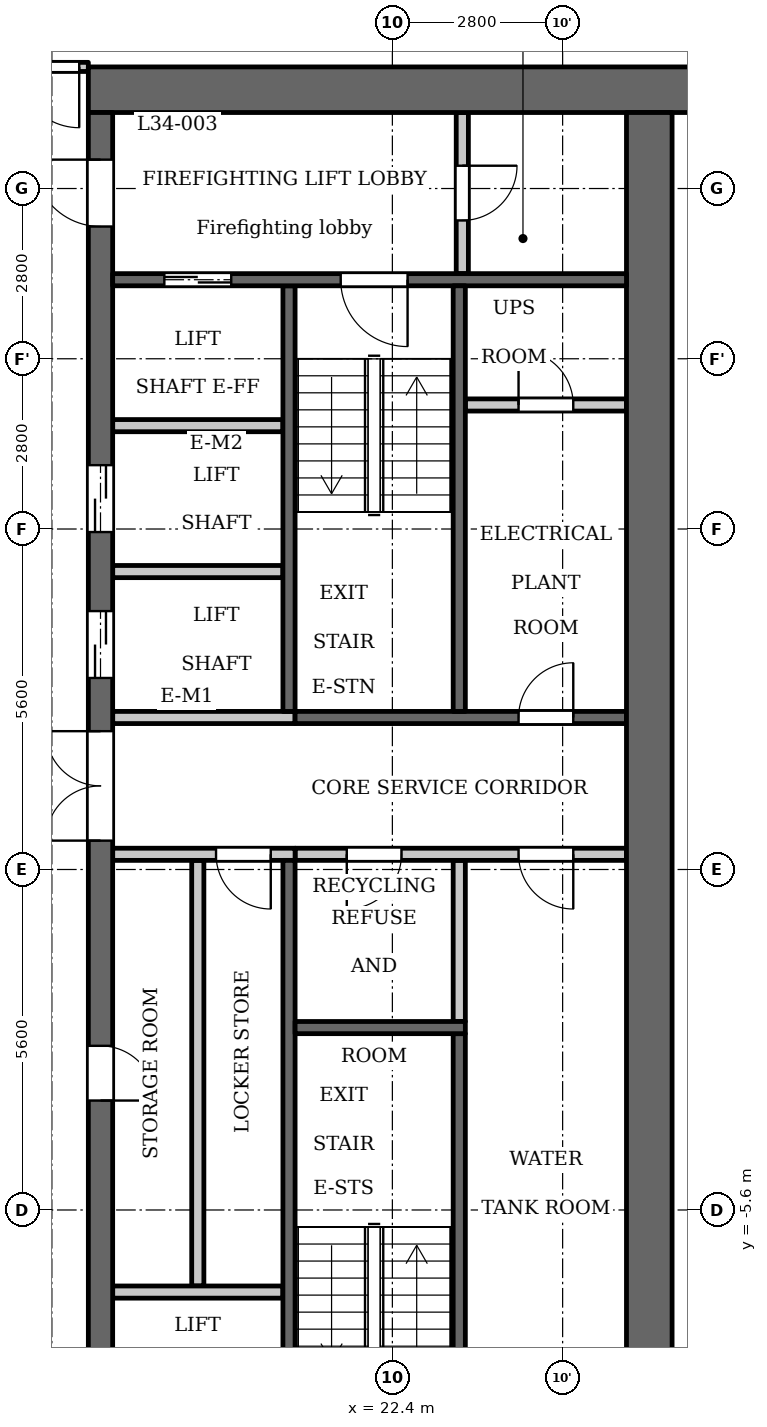
"""IFC4 building model, lengths in metres.
Left out: names, types, materials, properties, quantities, classifications, styles, units other than length and angle.
Written with IfcOpenShell. Run it as: python <this file> out.ifc"""

import sys

from ifc_helpers import new_model, si_unit, direction, frame, frame_2d, origin, place, context, subcontext, project, spatial, rectangle, extrude, element, fill, save


model = new_model("IFC4")
c1 = context("Model", 3, precision=1e-05, world=origin(), true_north=direction((0.0, 1.0)))
c2 = subcontext(c1, "Body", "Model", "MODEL_VIEW")
j1 = project(units=[si_unit("LENGTHUNIT", "METRE"), si_unit("PLANEANGLEUNIT", "RADIAN")], contexts=[c1])
p1 = place(None, origin())
s1 = spatial("IfcSite", under=j1, at=p1, CompositionType="ELEMENT")
p2 = place(p1, origin())
s2 = spatial("IfcBuilding", under=s1, at=p2, CompositionType="ELEMENT")
p3 = place(p2, frame((0.0, 0.0, 136.1)))
s3 = spatial("IfcBuildingStorey", under=s2, at=p3, CompositionType="ELEMENT", Elevation=136.1)
p4 = place(p3, frame((23.5, -2.5, 0.0), z_axis=(0.0, 0.0, 1.0), x_axis=(0.0, 1.0, 0.0)))
e1 = element("IfcWall", 1, at=p4, inside=s3, PredefinedType="PARTITIONING", context=c2, shape_type="SweptSolid", body=[
    extrude(rectangle(XDim=2.65, YDim=0.2, at=frame_2d((1.325, 0.0))), origin(), (0.0, 0.0, 1.0), 3.2),
])
p5 = place(p3, frame((20.7, 2.6, 0.0), z_axis=(0.0, 0.0, 1.0), x_axis=(0.0, 1.0, 0.0)))
e2 = element("IfcWall", 2, at=p5, inside=s3, PredefinedType="SHEAR", context=c2, shape_type="SweptSolid", body=[
    extrude(rectangle(XDim=7.0, YDim=0.2, at=frame_2d((3.5, 0.0))), origin(), (0.0, 0.0, 1.0), 3.2),
])
p6 = place(p3, frame((20.7, -9.6, 0.0), z_axis=(0.0, 0.0, 1.0), x_axis=(0.0, 1.0, 0.0)))
e3 = element("IfcWall", 3, at=p6, inside=s3, PredefinedType="SHEAR", context=c2, shape_type="SweptSolid", body=[
    extrude(rectangle(XDim=9.75, YDim=0.2, at=frame_2d((4.875, 0.0))), origin(), (0.0, 0.0, 1.0), 3.2),
])
p7 = place(p3, frame((20.8, 2.5, 0.0), z_axis=(0.0, 0.0, 1.0), x_axis=(1.0, 0.0, 0.0)))
e4 = element("IfcWall", 4, at=p7, inside=s3, PredefinedType="SHEAR", context=c2, shape_type="SweptSolid", body=[
    extrude(rectangle(XDim=5.45, YDim=0.2, at=frame_2d((2.725, 0.0))), origin(), (0.0, 0.0, 1.0), 3.2),
])
p8 = place(p7, frame((3.675, 0.0, 0.0)))
e5 = element("IfcOpeningElement", 5, at=p8, cuts=e4, PredefinedType="OPENING", context=c2, shape_type="SweptSolid", body=[
    extrude(rectangle(XDim=0.9, YDim=2.1, at=frame_2d((0.45, 1.05))), frame((0.0, 0.11, 0.0), z_axis=(0.0, -1.0, 0.0), x_axis=(1.0, 0.0, 0.0)), (0.0, 0.0, 1.0), 0.22),
])
p9 = place(p3, frame((20.8, 0.25, 0.0), z_axis=(0.0, 0.0, 1.0), x_axis=(1.0, 0.0, 0.0)))
e6 = element("IfcWall", 6, at=p9, inside=s3, PredefinedType="PARTITIONING", context=c2, shape_type="SweptSolid", body=[
    extrude(rectangle(XDim=5.45, YDim=0.2, at=frame_2d((2.725, 0.0))), origin(), (0.0, 0.0, 1.0), 3.2),
])
p10 = place(p9, frame((0.85, 0.0, 0.0)))
e7 = element("IfcOpeningElement", 7, at=p10, cuts=e6, PredefinedType="OPENING", context=c2, shape_type="SweptSolid", body=[
    extrude(rectangle(XDim=0.9, YDim=2.1, at=frame_2d((0.45, 1.05))), frame((0.0, 0.11, 0.0), z_axis=(0.0, -1.0, 0.0), x_axis=(1.0, 0.0, 0.0)), (0.0, 0.0, 1.0), 0.22),
])
p11 = place(p9, frame((3.675, 0.0, 0.0)))
e8 = element("IfcOpeningElement", 8, at=p11, cuts=e6, PredefinedType="OPENING", context=c2, shape_type="SweptSolid", body=[
    extrude(rectangle(XDim=0.9, YDim=2.1, at=frame_2d((0.45, 1.05))), frame((0.0, 0.11, 0.0), z_axis=(0.0, -1.0, 0.0), x_axis=(1.0, 0.0, 0.0)), (0.0, 0.0, 1.0), 0.22),
])
p12 = place(p3, frame((17.4, 12.825, 0.0), z_axis=(0.0, 0.0, 1.0), x_axis=(1.0, 0.0, 0.0)))
e9 = element("IfcWall", 9, at=p12, inside=s3, PredefinedType="SHEAR", context=c2, shape_type="SweptSolid", body=[
    extrude(rectangle(XDim=10.4, YDim=0.75, at=frame_2d((5.2, 0.0))), origin(), (0.0, 0.0, 1.0), 3.2),
])
p13 = place(p3, frame((19.2, -6.85, 0.0), z_axis=(0.0, 0.0, 1.0), x_axis=(0.0, 1.0, 0.0)))
e10 = element("IfcWall", 10, at=p13, inside=s3, PredefinedType="PARTITIONING", context=c2, shape_type="SweptSolid", body=[
    extrude(rectangle(XDim=7.0, YDim=0.2, at=frame_2d((3.5, 0.0))), origin(), (0.0, 0.0, 1.0), 3.2),
])
p14 = place(p3, frame((17.6, -12.45, 0.0), z_axis=(0.0, 0.0, 1.0), x_axis=(0.0, 1.0, 0.0)))
e11 = element("IfcWall", 11, at=p14, inside=s3, PredefinedType="SHEAR", context=c2, shape_type="SweptSolid", body=[
    extrude(rectangle(XDim=24.9, YDim=0.4, at=frame_2d((12.45, 0.0))), origin(), (0.0, 0.0, 1.0), 3.2),
])
p15 = place(p14, frame((8.65, 0.0, 0.0)))
e12 = element("IfcOpeningElement", 12, at=p15, cuts=e11, PredefinedType="OPENING", context=c2, shape_type="SweptSolid", body=[
    extrude(rectangle(XDim=0.9, YDim=2.1, at=frame_2d((0.45, 1.05))), frame((0.0, 0.21, 0.0), z_axis=(0.0, -1.0, 0.0), x_axis=(1.0, 0.0, 0.0)), (0.0, 0.0, 1.0), 0.42),
])
p16 = place(p14, frame((15.6, 0.0, 0.0)))
e13 = element("IfcOpeningElement", 13, at=p16, cuts=e11, PredefinedType="OPENING", context=c2, shape_type="SweptSolid", body=[
    extrude(rectangle(XDim=1.1, YDim=2.1, at=frame_2d((0.55, 1.05))), frame((0.0, 0.21, 0.0), z_axis=(0.0, -1.0, 0.0), x_axis=(1.0, 0.0, 0.0)), (0.0, 0.0, 1.0), 0.42),
])
p17 = place(p14, frame((18.0, 0.0, 0.0)))
e14 = element("IfcOpeningElement", 14, at=p17, cuts=e11, PredefinedType="OPENING", context=c2, shape_type="SweptSolid", body=[
    extrude(rectangle(XDim=1.1, YDim=2.1, at=frame_2d((0.55, 1.05))), frame((0.0, 0.21, 0.0), z_axis=(0.0, -1.0, 0.0), x_axis=(1.0, 0.0, 0.0)), (0.0, 0.0, 1.0), 0.42),
])
p18 = place(p14, frame((23.025, 0.0, 0.0)))
e15 = element("IfcOpeningElement", 15, at=p18, cuts=e11, PredefinedType="OPENING", context=c2, shape_type="SweptSolid", body=[
    extrude(rectangle(XDim=1.1, YDim=2.1, at=frame_2d((0.55, 1.05))), frame((0.0, 0.21, 0.0), z_axis=(0.0, -1.0, 0.0), x_axis=(1.0, 0.0, 0.0)), (0.0, 0.0, 1.0), 0.42),
])
p19 = place(p14, frame((0.775, 0.0, 0.0)))
e16 = element("IfcOpeningElement", 16, at=p19, cuts=e11, PredefinedType="OPENING", context=c2, shape_type="SweptSolid", body=[
    extrude(rectangle(XDim=1.1, YDim=2.1, at=frame_2d((0.55, 1.05))), frame((0.0, 0.21, 0.0), z_axis=(0.0, -1.0, 0.0), x_axis=(1.0, 0.0, 0.0)), (0.0, 0.0, 1.0), 0.42),
])
p20 = place(p14, frame((12.925, 0.0, 0.0)))
e17 = element("IfcOpeningElement", 17, at=p20, cuts=e11, PredefinedType="OPENING", context=c2, shape_type="SweptSolid", body=[
    extrude(rectangle(XDim=1.8, YDim=2.1, at=frame_2d((0.9, 1.05))), frame((0.0, 0.21, 0.0), z_axis=(0.0, -1.0, 0.0), x_axis=(1.0, 0.0, 0.0)), (0.0, 0.0, 1.0), 0.42),
])
p21 = place(p3, frame((26.625, -12.45, 0.0), z_axis=(0.0, 0.0, 1.0), x_axis=(0.0, 1.0, 0.0)))
e18 = element("IfcWall", 18, at=p21, inside=s3, PredefinedType="SHEAR", context=c2, shape_type="SweptSolid", body=[
    extrude(rectangle(XDim=24.9, YDim=0.75, at=frame_2d((12.45, 0.0))), origin(), (0.0, 0.0, 1.0), 3.2),
])
p22 = place(p3, frame((23.55, 9.8, 0.0), z_axis=(0.0, 0.0, 1.0), x_axis=(0.0, 1.0, 0.0)))
e19 = element("IfcWall", 19, at=p22, inside=s3, PredefinedType="PARTITIONING", context=c2, shape_type="SweptSolid", body=[
    extrude(rectangle(XDim=2.65, YDim=0.2, at=frame_2d((1.325, 0.0))), origin(), (0.0, 0.0, 1.0), 3.2),
])
p23 = place(p22, frame((0.875, 0.0, 0.0)))
e20 = element("IfcOpeningElement", 20, at=p23, cuts=e19, PredefinedType="OPENING", context=c2, shape_type="SweptSolid", body=[
    extrude(rectangle(XDim=0.9, YDim=2.1, at=frame_2d((0.45, 1.05))), frame((0.0, 0.11, 0.0), z_axis=(0.0, -1.0, 0.0), x_axis=(1.0, 0.0, 0.0)), (0.0, 0.0, 1.0), 0.22),
])
p24 = place(p3, frame((23.6, 7.64, 0.0), z_axis=(0.0, 0.0, 1.0), x_axis=(1.0, 0.0, 0.0)))
e21 = element("IfcWall", 21, at=p24, inside=s3, PredefinedType="PARTITIONING", context=c2, shape_type="SweptSolid", body=[
    extrude(rectangle(XDim=2.65, YDim=0.2, at=frame_2d((1.325, 0.0))), origin(), (0.0, 0.0, 1.0), 3.2),
])
p25 = place(p24, frame((0.875, 0.0, 0.0)))
e22 = element("IfcOpeningElement", 22, at=p25, cuts=e21, PredefinedType="OPENING", context=c2, shape_type="SweptSolid", body=[
    extrude(rectangle(XDim=0.9, YDim=2.1, at=frame_2d((0.45, 1.05))), frame((0.0, 0.11, 0.0), z_axis=(0.0, -1.0, 0.0), x_axis=(1.0, 0.0, 0.0)), (0.0, 0.0, 1.0), 0.22),
])
p26 = place(p3, frame((17.8, -6.95, 0.0), z_axis=(0.0, 0.0, 1.0), x_axis=(1.0, 0.0, 0.0)))
e23 = element("IfcWall", 23, at=p26, inside=s3, PredefinedType="PARTITIONING", context=c2, shape_type="SweptSolid", body=[
    extrude(rectangle(XDim=2.8, YDim=0.2, at=frame_2d((1.4, 0.0))), origin(), (0.0, 0.0, 1.0), 3.2),
])
p27 = place(p3, frame((17.8, 0.25, 0.0), z_axis=(0.0, 0.0, 1.0), x_axis=(1.0, 0.0, 0.0)))
e24 = element("IfcWall", 24, at=p27, inside=s3, PredefinedType="PARTITIONING", context=c2, shape_type="SweptSolid", body=[
    extrude(rectangle(XDim=3.0, YDim=0.2, at=frame_2d((1.5, 0.0))), origin(), (0.0, 0.0, 1.0), 3.2),
])
p28 = place(p27, frame((1.7, 0.0, 0.0)))
e25 = element("IfcOpeningElement", 25, at=p28, cuts=e24, PredefinedType="OPENING", context=c2, shape_type="SweptSolid", body=[
    extrude(rectangle(XDim=0.9, YDim=2.1, at=frame_2d((0.45, 1.05))), frame((0.0, 0.11, 0.0), z_axis=(0.0, -1.0, 0.0), x_axis=(1.0, 0.0, 0.0)), (0.0, 0.0, 1.0), 0.22),
])
p29 = place(p3, frame((17.8, 2.5, 0.0), z_axis=(0.0, 0.0, 1.0), x_axis=(1.0, 0.0, 0.0)))
e26 = element("IfcWall", 26, at=p29, inside=s3, PredefinedType="PARTITIONING", context=c2, shape_type="SweptSolid", body=[
    extrude(rectangle(XDim=3.0, YDim=0.2, at=frame_2d((1.5, 0.0))), origin(), (0.0, 0.0, 1.0), 3.2),
])
for number, where, z_axis, x_axis in (
    (27, (17.8, 4.9, 0.0), (0.0, 0.0, 1.0), (1.0, 0.0, 0.0)),
    (28, (17.8, 7.3, 0.0), (0.0, 0.0, 1.0), (1.0, 0.0, 0.0)),
):
    element("IfcWall", number, at=place(p3, frame(where, z_axis=z_axis, x_axis=x_axis)), inside=s3, PredefinedType="PARTITIONING", context=c2, shape_type="SweptSolid", body=[
        extrude(rectangle(XDim=2.8, YDim=0.2, at=frame_2d((1.4, 0.0))), origin(), (0.0, 0.0, 1.0), 3.2),
    ])
p30 = place(p3, frame((17.8, 9.7, 0.0), z_axis=(0.0, 0.0, 1.0), x_axis=(1.0, 0.0, 0.0)))
e29 = element("IfcWall", 29, at=p30, inside=s3, PredefinedType="SHEAR", context=c2, shape_type="SweptSolid", body=[
    extrude(rectangle(XDim=8.45, YDim=0.2, at=frame_2d((4.225, 0.0))), origin(), (0.0, 0.0, 1.0), 3.2),
])
p31 = place(p30, frame((0.85, 0.0, 0.0)))
e30 = element("IfcOpeningElement", 30, at=p31, cuts=e29, PredefinedType="OPENING", context=c2, shape_type="SweptSolid", body=[
    extrude(rectangle(XDim=1.1, YDim=2.1, at=frame_2d((0.55, 1.05))), frame((0.0, 0.11, 0.0), z_axis=(0.0, -1.0, 0.0), x_axis=(1.0, 0.0, 0.0)), (0.0, 0.0, 1.0), 0.22),
])
p32 = place(p30, frame((3.75, 0.0, 0.0)))
e31 = element("IfcOpeningElement", 31, at=p32, cuts=e29, PredefinedType="OPENING", context=c2, shape_type="SweptSolid", body=[
    extrude(rectangle(XDim=1.1, YDim=2.1, at=frame_2d((0.55, 1.05))), frame((0.0, 0.11, 0.0), z_axis=(0.0, -1.0, 0.0), x_axis=(1.0, 0.0, 0.0)), (0.0, 0.0, 1.0), 0.22),
])
p33 = place(p3, frame((23.5, 2.6, 0.0), z_axis=(0.0, 0.0, 1.0), x_axis=(0.0, 1.0, 0.0)))
e32 = element("IfcWall", 32, at=p33, inside=s3, PredefinedType="SHEAR", context=c2, shape_type="SweptSolid", body=[
    extrude(rectangle(XDim=7.0, YDim=0.2, at=frame_2d((3.5, 0.0))), origin(), (0.0, 0.0, 1.0), 3.2),
])
p34 = place(p3, frame((23.5, -9.6, 0.0), z_axis=(0.0, 0.0, 1.0), x_axis=(0.0, 1.0, 0.0)))
e33 = element("IfcWall", 33, at=p34, inside=s3, PredefinedType="SHEAR", context=c2, shape_type="SweptSolid", body=[
    extrude(rectangle(XDim=6.9, YDim=0.2, at=frame_2d((3.45, 0.0))), origin(), (0.0, 0.0, 1.0), 3.2),
])
p35 = place(p3, frame((20.8, -2.6, 0.0), z_axis=(0.0, 0.0, 1.0), x_axis=(1.0, 0.0, 0.0)))
e34 = element("IfcWall", 34, at=p35, inside=s3, PredefinedType="SHEAR", context=c2, shape_type="SweptSolid", body=[
    extrude(rectangle(XDim=2.8, YDim=0.2, at=frame_2d((1.4, 0.0))), origin(), (0.0, 0.0, 1.0), 3.2),
])
p36 = place(p3, frame((-17.4, 13.2, 0.0), z_axis=(0.0, 0.0, 1.0), x_axis=(1.0, 0.0, 0.0)))
e35 = element("IfcWall", 35, at=p36, inside=s3, PredefinedType="PARTITIONING", context=c2, shape_type="SweptSolid", body=[
    extrude(rectangle(XDim=34.8, YDim=0.15, at=frame_2d((17.4, 0.0))), origin(), (0.0, 0.0, 1.0), 3.2),
])
p37 = place(p36, frame((0.25, 0.0, 0.0)))
e36 = element("IfcOpeningElement", 36, at=p37, cuts=e35, PredefinedType="OPENING", context=c2, shape_type="SweptSolid", body=[
    extrude(rectangle(XDim=1.0, YDim=2.1, at=frame_2d((0.5, 1.05))), frame((0.0, 0.085, 0.0), z_axis=(0.0, -1.0, 0.0), x_axis=(1.0, 0.0, 0.0)), (0.0, 0.0, 1.0), 0.17),
])
p38 = place(p36, frame((33.65, 0.0, 0.0)))
e37 = element("IfcOpeningElement", 37, at=p38, cuts=e35, PredefinedType="OPENING", context=c2, shape_type="SweptSolid", body=[
    extrude(rectangle(XDim=1.0, YDim=2.1, at=frame_2d((0.5, 1.05))), frame((0.0, 0.085, 0.0), z_axis=(0.0, -1.0, 0.0), x_axis=(1.0, 0.0, 0.0)), (0.0, 0.0, 1.0), 0.17),
])
p39 = place(p36, frame((15.75, 0.0, 0.0)))
e38 = element("IfcOpeningElement", 38, at=p39, cuts=e35, PredefinedType="OPENING", context=c2, shape_type="SweptSolid", body=[
    extrude(rectangle(XDim=1.0, YDim=2.1, at=frame_2d((0.5, 1.05))), frame((0.0, 0.085, 0.0), z_axis=(0.0, -1.0, 0.0), x_axis=(1.0, 0.0, 0.0)), (0.0, 0.0, 1.0), 0.17),
])
p40 = place(p36, frame((19.35, 0.0, 0.0)))
e39 = element("IfcOpeningElement", 39, at=p40, cuts=e35, PredefinedType="OPENING", context=c2, shape_type="SweptSolid", body=[
    extrude(rectangle(XDim=1.0, YDim=2.1, at=frame_2d((0.5, 1.05))), frame((0.0, 0.085, 0.0), z_axis=(0.0, -1.0, 0.0), x_axis=(1.0, 0.0, 0.0)), (0.0, 0.0, 1.0), 0.17),
])
p41 = place(p36, frame((26.95, 0.0, 0.0)))
e40 = element("IfcOpeningElement", 40, at=p41, cuts=e35, PredefinedType="OPENING", context=c2, shape_type="SweptSolid", body=[
    extrude(rectangle(XDim=1.0, YDim=2.1, at=frame_2d((0.5, 1.05))), frame((0.0, 0.085, 0.0), z_axis=(0.0, -1.0, 0.0), x_axis=(1.0, 0.0, 0.0)), (0.0, 0.0, 1.0), 0.17),
])
p42 = place(p36, frame((29.75, 0.0, 0.0)))
e41 = element("IfcOpeningElement", 41, at=p42, cuts=e35, PredefinedType="OPENING", context=c2, shape_type="SweptSolid", body=[
    extrude(rectangle(XDim=1.0, YDim=2.1, at=frame_2d((0.5, 1.05))), frame((0.0, 0.085, 0.0), z_axis=(0.0, -1.0, 0.0), x_axis=(1.0, 0.0, 0.0)), (0.0, 0.0, 1.0), 0.17),
])
p43 = place(p15, origin())
e42 = element("IfcDoor", 42, at=p43, inside=s3, OperationType="SINGLE_SWING_LEFT", PredefinedType="DOOR", context=c2, shape_type="SweptSolid", body=[
    extrude(rectangle(XDim=0.9, YDim=2.1, at=frame_2d((0.45, 1.05))), frame((0.0, 0.025, 0.0), z_axis=(0.0, -1.0, 0.0), x_axis=(1.0, 0.0, 0.0)), (0.0, 0.0, 1.0), 0.05),
])
fill(e12, e42)
p44 = place(p28, origin())
e43 = element("IfcDoor", 43, at=p44, inside=s3, OperationType="SINGLE_SWING_RIGHT", PredefinedType="DOOR", context=c2, shape_type="SweptSolid", body=[
    extrude(rectangle(XDim=0.9, YDim=2.1, at=frame_2d((0.45, 1.05))), frame((0.0, 0.025, 0.0), z_axis=(0.0, -1.0, 0.0), x_axis=(1.0, 0.0, 0.0)), (0.0, 0.0, 1.0), 0.05),
])
fill(e25, e43)
p45 = place(p16, origin())
e44 = element("IfcDoor", 44, at=p45, inside=s3, OperationType="DOUBLE_DOOR_SLIDING", PredefinedType="DOOR", context=c2, shape_type="SweptSolid", body=[
    extrude(rectangle(XDim=1.1, YDim=2.1, at=frame_2d((0.55, 1.05))), frame((0.0, 0.025, 0.0), z_axis=(0.0, -1.0, 0.0), x_axis=(1.0, 0.0, 0.0)), (0.0, 0.0, 1.0), 0.05),
])
fill(e13, e44)
p46 = place(p17, origin())
e45 = element("IfcDoor", 45, at=p46, inside=s3, OperationType="DOUBLE_DOOR_SLIDING", PredefinedType="DOOR", context=c2, shape_type="SweptSolid", body=[
    extrude(rectangle(XDim=1.1, YDim=2.1, at=frame_2d((0.55, 1.05))), frame((0.0, 0.025, 0.0), z_axis=(0.0, -1.0, 0.0), x_axis=(1.0, 0.0, 0.0)), (0.0, 0.0, 1.0), 0.05),
])
fill(e14, e45)
p47 = place(p31, origin())
e46 = element("IfcDoor", 46, at=p47, inside=s3, OperationType="DOUBLE_DOOR_SLIDING", PredefinedType="DOOR", context=c2, shape_type="SweptSolid", body=[
    extrude(rectangle(XDim=1.1, YDim=2.1, at=frame_2d((0.55, 1.05))), frame((0.0, 0.025, 0.0), z_axis=(0.0, -1.0, 0.0), x_axis=(1.0, 0.0, 0.0)), (0.0, 0.0, 1.0), 0.05),
])
fill(e30, e46)
p48 = place(p18, origin())
e47 = element("IfcDoor", 47, at=p48, inside=s3, OperationType="SINGLE_SWING_LEFT", PredefinedType="DOOR", context=c2, shape_type="SweptSolid", body=[
    extrude(rectangle(XDim=1.1, YDim=2.1, at=frame_2d((0.55, 1.05))), frame((0.0, 0.025, 0.0), z_axis=(0.0, -1.0, 0.0), x_axis=(1.0, 0.0, 0.0)), (0.0, 0.0, 1.0), 0.05),
])
fill(e15, e47)
p49 = place(p23, origin())
e48 = element("IfcDoor", 48, at=p49, inside=s3, OperationType="SINGLE_SWING_RIGHT", PredefinedType="DOOR", context=c2, shape_type="SweptSolid", body=[
    extrude(rectangle(XDim=0.9, YDim=2.1, at=frame_2d((0.45, 1.05))), frame((0.0, 0.025, 0.0), z_axis=(0.0, -1.0, 0.0), x_axis=(1.0, 0.0, 0.0)), (0.0, 0.0, 1.0), 0.05),
])
fill(e20, e48)
p50 = place(p32, origin())
e49 = element("IfcDoor", 49, at=p50, inside=s3, OperationType="SINGLE_SWING_RIGHT", PredefinedType="DOOR", context=c2, shape_type="SweptSolid", body=[
    extrude(rectangle(XDim=1.1, YDim=2.1, at=frame_2d((0.55, 1.05))), frame((0.0, 0.025, 0.0), z_axis=(0.0, -1.0, 0.0), x_axis=(1.0, 0.0, 0.0)), (0.0, 0.0, 1.0), 0.05),
])
fill(e31, e49)
p51 = place(p20, origin())
e50 = element("IfcDoor", 50, at=p51, inside=s3, OperationType="DOUBLE_DOOR_SINGLE_SWING", PredefinedType="DOOR", context=c2, shape_type="SweptSolid", body=[
    extrude(rectangle(XDim=1.8, YDim=2.1, at=frame_2d((0.9, 1.05))), frame((0.0, 0.025, 0.0), z_axis=(0.0, -1.0, 0.0), x_axis=(1.0, 0.0, 0.0)), (0.0, 0.0, 1.0), 0.05),
])
fill(e17, e50)
p52 = place(p10, origin())
e51 = element("IfcDoor", 51, at=p52, inside=s3, OperationType="SINGLE_SWING_LEFT", PredefinedType="DOOR", context=c2, shape_type="SweptSolid", body=[
    extrude(rectangle(XDim=0.9, YDim=2.1, at=frame_2d((0.45, 1.05))), frame((0.0, 0.025, 0.0), z_axis=(0.0, -1.0, 0.0), x_axis=(1.0, 0.0, 0.0)), (0.0, 0.0, 1.0), 0.05),
])
fill(e7, e51)
p53 = place(p11, origin())
e52 = element("IfcDoor", 52, at=p53, inside=s3, OperationType="SINGLE_SWING_RIGHT", PredefinedType="DOOR", context=c2, shape_type="SweptSolid", body=[
    extrude(rectangle(XDim=0.9, YDim=2.1, at=frame_2d((0.45, 1.05))), frame((0.0, 0.025, 0.0), z_axis=(0.0, -1.0, 0.0), x_axis=(1.0, 0.0, 0.0)), (0.0, 0.0, 1.0), 0.05),
])
fill(e8, e52)
p54 = place(p25, origin())
e53 = element("IfcDoor", 53, at=p54, inside=s3, OperationType="SINGLE_SWING_RIGHT", PredefinedType="DOOR", context=c2, shape_type="SweptSolid", body=[
    extrude(rectangle(XDim=0.9, YDim=2.1, at=frame_2d((0.45, 1.05))), frame((0.0, 0.025, 0.0), z_axis=(0.0, -1.0, 0.0), x_axis=(1.0, 0.0, 0.0)), (0.0, 0.0, 1.0), 0.05),
])
fill(e22, e53)
p55 = place(p8, origin())
e54 = element("IfcDoor", 54, at=p55, inside=s3, OperationType="SINGLE_SWING_LEFT", PredefinedType="DOOR", context=c2, shape_type="SweptSolid", body=[
    extrude(rectangle(XDim=0.9, YDim=2.1, at=frame_2d((0.45, 1.05))), frame((0.0, 0.025, 0.0), z_axis=(0.0, -1.0, 0.0), x_axis=(1.0, 0.0, 0.0)), (0.0, 0.0, 1.0), 0.05),
])
fill(e5, e54)
p56 = place(p38, origin())
e55 = element("IfcDoor", 55, at=p56, inside=s3, OperationType="SINGLE_SWING_RIGHT", PredefinedType="DOOR", context=c2, shape_type="SweptSolid", body=[
    extrude(rectangle(XDim=1.0, YDim=2.1, at=frame_2d((0.5, 1.05))), frame((0.0, 0.025, 0.0), z_axis=(0.0, -1.0, 0.0), x_axis=(1.0, 0.0, 0.0)), (0.0, 0.0, 1.0), 0.05),
])
fill(e37, e55)
save(model, sys.argv[1])
